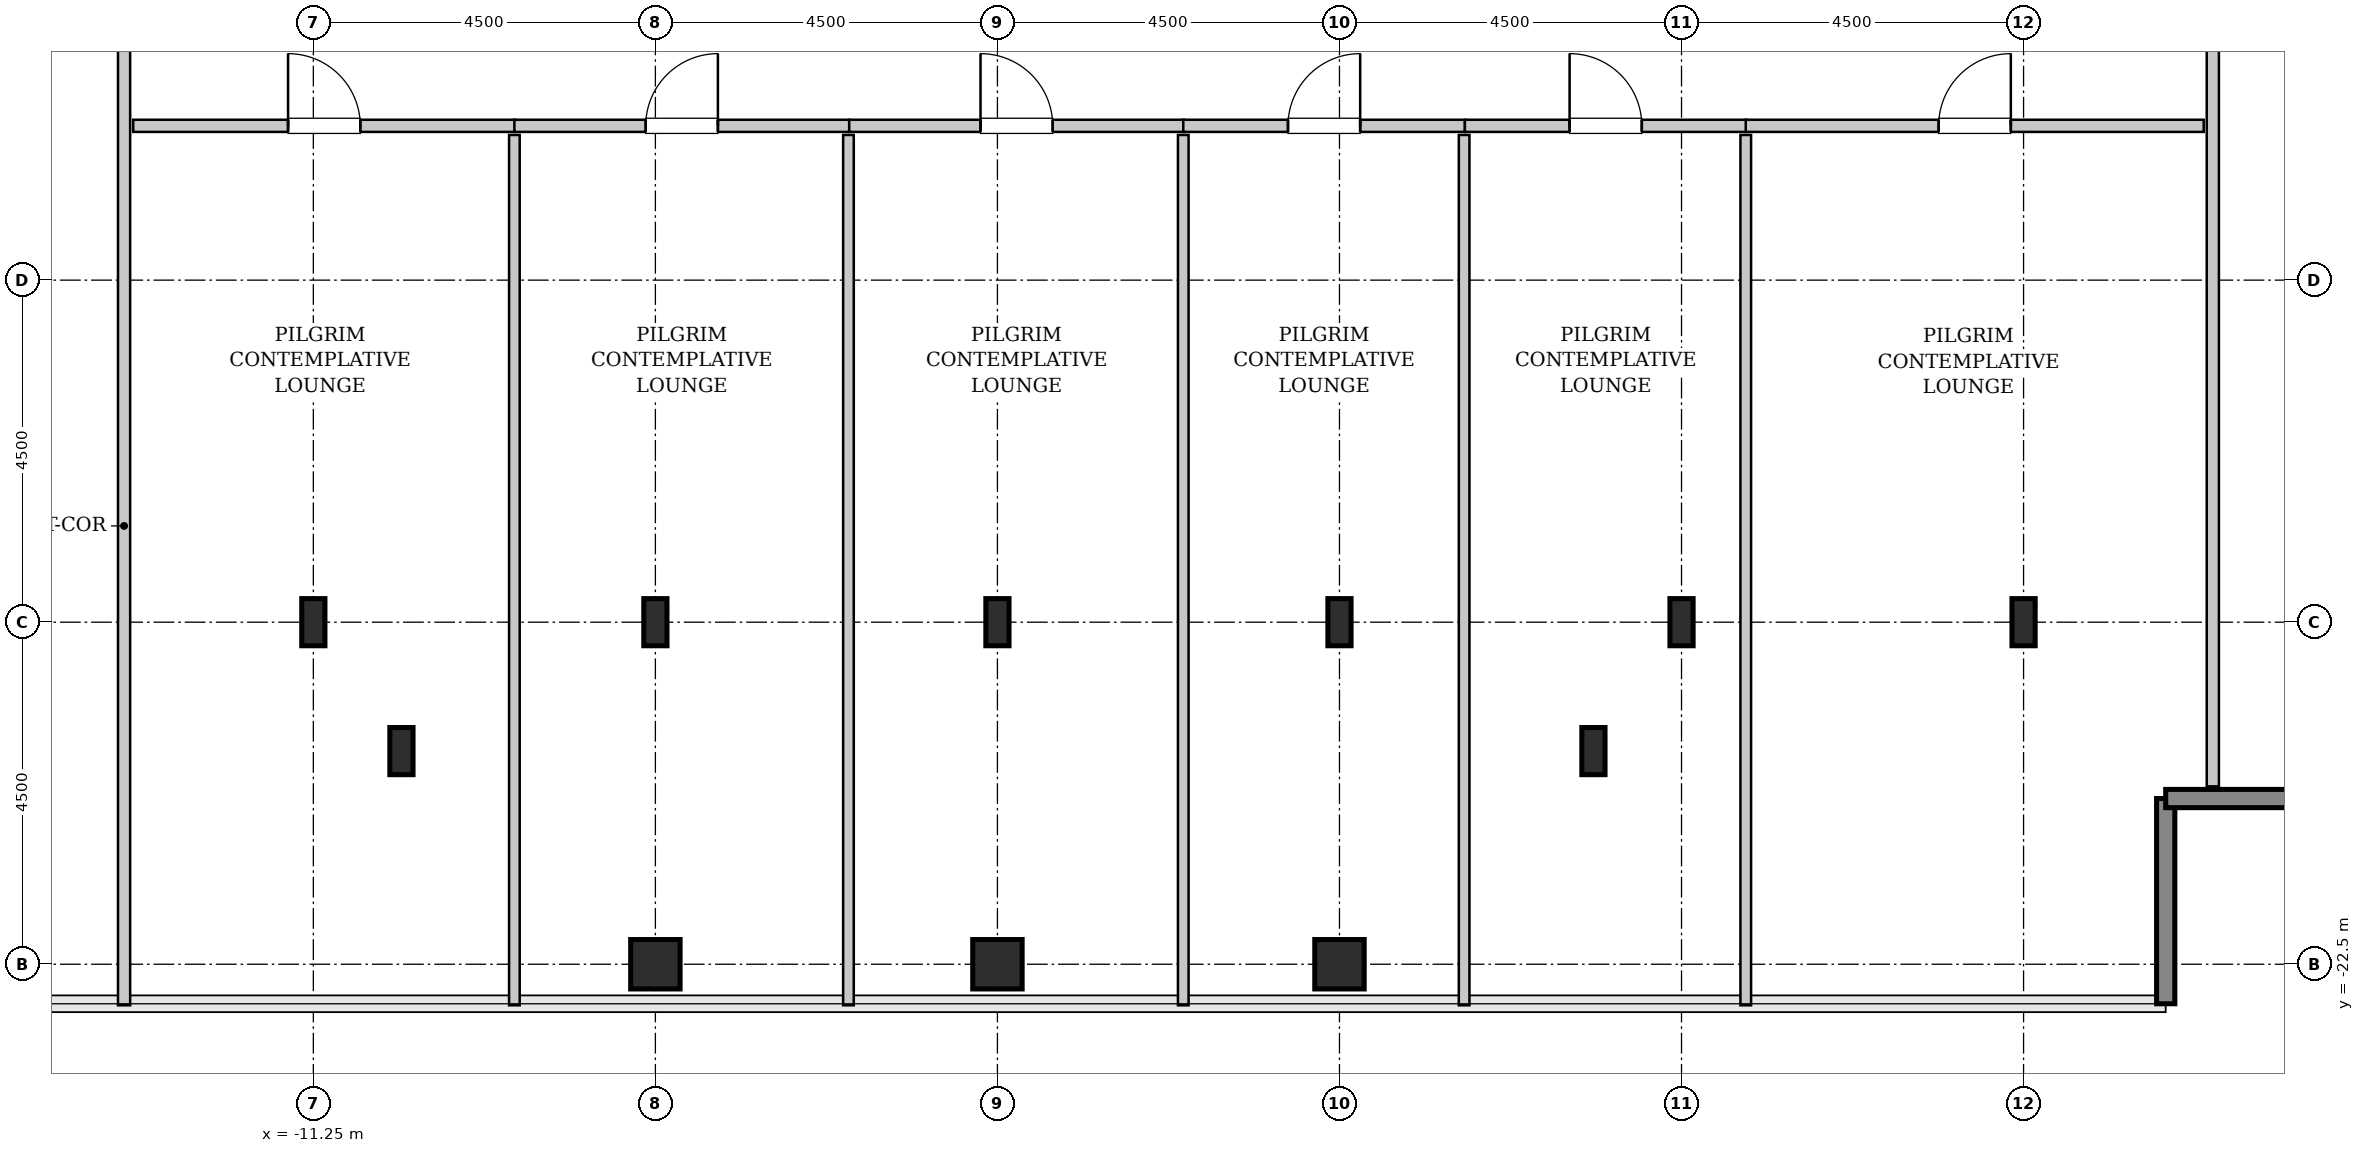
"""IFC4 building model, lengths in metres.
Left out: names, types, materials, properties, quantities, classifications, styles, units other than length and angle.
Written with IfcOpenShell. Run it as: python <this file> out.ifc"""

import sys

from ifc_helpers import new_model, si_unit, direction, frame, frame_2d, origin, origin_2d, place, context, subcontext, project, spatial, rectangle, hollow_rectangle, i_section, extrude, source, transform, mapped, element, fill, save


model = new_model("IFC4")
c1 = context("Model", 3, precision=1e-05, world=origin(), true_north=direction((0.0, 1.0)))
c2 = subcontext(c1, "Body", "Model", "MODEL_VIEW")
j1 = project(units=[si_unit("LENGTHUNIT", "METRE"), si_unit("PLANEANGLEUNIT", "RADIAN")], contexts=[c1])
p1 = place(None, origin())
s1 = spatial("IfcSite", under=j1, at=p1, CompositionType="ELEMENT")
p2 = place(p1, origin())
s2 = spatial("IfcBuilding", under=s1, at=p2, CompositionType="ELEMENT")
p3 = place(p2, frame((0.0, 0.0, 283.6)))
s3 = spatial("IfcBuildingStorey", under=s2, at=p3, CompositionType="ELEMENT", Elevation=283.6)
m1 = source(origin(), c2, "Body", "SweptSolid", [
    extrude(i_section(OverallWidth=0.305, OverallDepth=0.62, WebThickness=0.021, FlangeThickness=0.04, FilletRadius=0.027, at=origin_2d()), origin(), (0.0, 0.0, 1.0), 3.8),
])
for number, where, z_axis, x_axis in (
    (1, (-11.25, -18.0, 0.0), (0.0, 0.0, 1.0), (1.0, 0.0, 0.0)),
    (2, (-10.091, -19.696, 0.0), (0.0, 0.0, 1.0), (1.0, 0.0, 0.0)),
):
    element("IfcColumn", number, at=place(p3, frame(where, z_axis=z_axis, x_axis=x_axis)), inside=s3, PredefinedType="COLUMN", context=c2, shape_type="MappedRepresentation", body=[
        mapped(m1, transform((0.0, 0.0, 0.0), x_axis=(1.0, 0.0, 0.0), y_axis=(0.0, 1.0, 0.0), z_axis=(0.0, 0.0, 1.0), scale=1.0)),
    ])
m2 = source(origin(), c2, "Body", "SweptSolid", [
    extrude(hollow_rectangle(XDim=0.65, YDim=0.65, WallThickness=0.032, InnerFilletRadius=0.032, OuterFilletRadius=0.064, at=origin_2d()), origin(), (0.0, 0.0, 1.0), 3.8),
])
p4 = place(p3, frame((-6.75, -22.5, 0.0), z_axis=(0.0, 0.0, 1.0), x_axis=(1.0, 0.0, 0.0)))
e3 = element("IfcColumn", 3, at=p4, inside=s3, PredefinedType="COLUMN", context=c2, shape_type="MappedRepresentation", body=[
    mapped(m2, transform((0.0, 0.0, 0.0), x_axis=(1.0, 0.0, 0.0), y_axis=(0.0, 1.0, 0.0), z_axis=(0.0, 0.0, 1.0), scale=1.0)),
])
p5 = place(p3, frame((-6.75, -18.0, 0.0), z_axis=(0.0, 0.0, 1.0), x_axis=(1.0, 0.0, 0.0)))
e4 = element("IfcColumn", 4, at=p5, inside=s3, PredefinedType="COLUMN", context=c2, shape_type="MappedRepresentation", body=[
    mapped(m1, transform((0.0, 0.0, 0.0), x_axis=(1.0, 0.0, 0.0), y_axis=(0.0, 1.0, 0.0), z_axis=(0.0, 0.0, 1.0), scale=1.0)),
])
p6 = place(p3, frame((-2.25, -22.5, 0.0), z_axis=(0.0, 0.0, 1.0), x_axis=(1.0, 0.0, 0.0)))
e5 = element("IfcColumn", 5, at=p6, inside=s3, PredefinedType="COLUMN", context=c2, shape_type="MappedRepresentation", body=[
    mapped(m2, transform((0.0, 0.0, 0.0), x_axis=(1.0, 0.0, 0.0), y_axis=(0.0, 1.0, 0.0), z_axis=(0.0, 0.0, 1.0), scale=1.0)),
])
p7 = place(p3, frame((-2.25, -18.0, 0.0), z_axis=(0.0, 0.0, 1.0), x_axis=(1.0, 0.0, 0.0)))
e6 = element("IfcColumn", 6, at=p7, inside=s3, PredefinedType="COLUMN", context=c2, shape_type="MappedRepresentation", body=[
    mapped(m1, transform((0.0, 0.0, 0.0), x_axis=(1.0, 0.0, 0.0), y_axis=(0.0, 1.0, 0.0), z_axis=(0.0, 0.0, 1.0), scale=1.0)),
])
p8 = place(p3, frame((2.25, -22.5, 0.0), z_axis=(0.0, 0.0, 1.0), x_axis=(1.0, 0.0, 0.0)))
e7 = element("IfcColumn", 7, at=p8, inside=s3, PredefinedType="COLUMN", context=c2, shape_type="MappedRepresentation", body=[
    mapped(m2, transform((0.0, 0.0, 0.0), x_axis=(1.0, 0.0, 0.0), y_axis=(0.0, 1.0, 0.0), z_axis=(0.0, 0.0, 1.0), scale=1.0)),
])
for number, where, z_axis, x_axis in (
    (8, (2.25, -18.0, 0.0), (0.0, 0.0, 1.0), (1.0, 0.0, 0.0)),
    (9, (5.591, -19.696, 0.0), (0.0, 0.0, 1.0), (1.0, 0.0, 0.0)),
    (10, (6.75, -18.0, 0.0), (0.0, 0.0, 1.0), (1.0, 0.0, 0.0)),
    (11, (11.25, -18.0, 0.0), (0.0, 0.0, 1.0), (1.0, 0.0, 0.0)),
):
    element("IfcColumn", number, at=place(p3, frame(where, z_axis=z_axis, x_axis=x_axis)), inside=s3, PredefinedType="COLUMN", context=c2, shape_type="MappedRepresentation", body=[
        mapped(m1, transform((0.0, 0.0, 0.0), x_axis=(1.0, 0.0, 0.0), y_axis=(0.0, 1.0, 0.0), z_axis=(0.0, 0.0, 1.0), scale=1.0)),
    ])
m3 = source(origin(), c2, "Body", "SweptSolid", [
    extrude(rectangle(XDim=2.7, YDim=0.24, at=frame_2d((1.35, 0.0))), origin(), (0.0, 0.0, 1.0), 3.55),
])
for number, where, z_axis, x_axis in (
    (12, (13.12, -23.02, 0.0), (0.0, 0.0, 1.0), (0.0, 1.0, 0.0)),
    (13, (13.12, -20.32, 0.0), (0.0, 0.0, 1.0), (1.0, 0.0, 0.0)),
):
    element("IfcWall", number, at=place(p3, frame(where, z_axis=z_axis, x_axis=x_axis)), inside=s3, PredefinedType="SHEAR", context=c2, shape_type="MappedRepresentation", body=[
        mapped(m3, transform((0.0, 0.0, 0.0), x_axis=(1.0, 0.0, 0.0), y_axis=(0.0, 1.0, 0.0), z_axis=(0.0, 0.0, 1.0), scale=1.0)),
    ])
m4 = source(origin(), c2, "Body", "SweptSolid", [
    extrude(rectangle(XDim=14.545, YDim=0.16, at=frame_2d((7.272, 0.0))), origin(), (0.0, 0.0, 1.0), 3.535),
])
p9 = place(p3, frame((-13.74, -23.04, 0.0), z_axis=(0.0, 0.0, 1.0), x_axis=(0.0, 1.0, 0.0)))
e14 = element("IfcWall", 14, at=p9, inside=s3, PredefinedType="PARTITIONING", context=c2, shape_type="MappedRepresentation", body=[
    mapped(m4, transform((0.0, 0.0, 0.0), x_axis=(1.0, 0.0, 0.0), y_axis=(0.0, 1.0, 0.0), z_axis=(0.0, 0.0, 1.0), scale=1.0)),
])
p10 = place(p9, frame((12.562, 0.0, 0.0)))
e15 = element("IfcOpeningElement", 15, at=p10, cuts=e14, PredefinedType="OPENING", context=c2, shape_type="SweptSolid", body=[
    extrude(rectangle(XDim=0.95, YDim=2.1, at=frame_2d((0.475, 1.05))), frame((0.0, 0.09, 0.0), z_axis=(0.0, -1.0, 0.0), x_axis=(1.0, 0.0, 0.0)), (0.0, 0.0, 1.0), 0.18),
])
m5 = source(origin(), c2, "Body", "SweptSolid", [
    extrude(rectangle(XDim=12.965, YDim=0.16, at=frame_2d((6.482, 0.0))), origin(), (0.0, 0.0, 1.0), 3.535),
])
p11 = place(p3, frame((13.74, -20.16, 0.0), z_axis=(0.0, 0.0, 1.0), x_axis=(0.0, 1.0, 0.0)))
e16 = element("IfcWall", 16, at=p11, inside=s3, PredefinedType="PARTITIONING", context=c2, shape_type="MappedRepresentation", body=[
    mapped(m5, transform((0.0, 0.0, 0.0), x_axis=(1.0, 0.0, 0.0), y_axis=(0.0, 1.0, 0.0), z_axis=(0.0, 0.0, 1.0), scale=1.0)),
])
p12 = place(p11, frame((10.333, 0.0, 0.0)))
e17 = element("IfcOpeningElement", 17, at=p12, cuts=e16, PredefinedType="OPENING", context=c2, shape_type="SweptSolid", body=[
    extrude(rectangle(XDim=0.95, YDim=2.1, at=frame_2d((0.475, 1.05))), frame((0.0, 0.09, 0.0), z_axis=(0.0, -1.0, 0.0), x_axis=(1.0, 0.0, 0.0)), (0.0, 0.0, 1.0), 0.18),
])
m6 = source(origin(), c2, "Body", "SweptSolid", [
    extrude(rectangle(XDim=5.025, YDim=0.16, at=frame_2d((2.513, 0.0))), origin(), (0.0, 0.0, 1.0), 3.535),
])
p13 = place(p3, frame((-13.62, -11.47, 0.0), z_axis=(0.0, 0.0, 1.0), x_axis=(1.0, 0.0, 0.0)))
e18 = element("IfcWall", 18, at=p13, inside=s3, PredefinedType="PARTITIONING", context=c2, shape_type="MappedRepresentation", body=[
    mapped(m6, transform((0.0, 0.0, 0.0), x_axis=(1.0, 0.0, 0.0), y_axis=(0.0, 1.0, 0.0), z_axis=(0.0, 0.0, 1.0), scale=1.0)),
])
p14 = place(p13, frame((2.038, 0.0, 0.0)))
e19 = element("IfcOpeningElement", 19, at=p14, cuts=e18, PredefinedType="OPENING", context=c2, shape_type="SweptSolid", body=[
    extrude(rectangle(XDim=0.95, YDim=2.1, at=frame_2d((0.475, 1.05))), frame((0.0, 0.09, 0.0), z_axis=(0.0, -1.0, 0.0), x_axis=(1.0, 0.0, 0.0)), (0.0, 0.0, 1.0), 0.18),
])
m7 = source(origin(), c2, "Body", "SweptSolid", [
    extrude(rectangle(XDim=11.45, YDim=0.14, at=frame_2d((5.725, 0.0))), origin(), (0.0, 0.0, 1.0), 3.535),
])
p15 = place(p3, frame((-8.605, -23.04, 0.0), z_axis=(0.0, 0.0, 1.0), x_axis=(0.0, 1.0, 0.0)))
e20 = element("IfcWall", 20, at=p15, inside=s3, PredefinedType="PARTITIONING", context=c2, shape_type="MappedRepresentation", body=[
    mapped(m7, transform((0.0, 0.0, 0.0), x_axis=(1.0, 0.0, 0.0), y_axis=(0.0, 1.0, 0.0), z_axis=(0.0, 0.0, 1.0), scale=1.0)),
])
m8 = source(origin(), c2, "Body", "SweptSolid", [
    extrude(rectangle(XDim=4.405, YDim=0.16, at=frame_2d((2.203, 0.0))), origin(), (0.0, 0.0, 1.0), 3.535),
])
p16 = place(p3, frame((-8.605, -11.47, 0.0), z_axis=(0.0, 0.0, 1.0), x_axis=(1.0, 0.0, 0.0)))
e21 = element("IfcWall", 21, at=p16, inside=s3, PredefinedType="PARTITIONING", context=c2, shape_type="MappedRepresentation", body=[
    mapped(m8, transform((0.0, 0.0, 0.0), x_axis=(1.0, 0.0, 0.0), y_axis=(0.0, 1.0, 0.0), z_axis=(0.0, 0.0, 1.0), scale=1.0)),
])
p17 = place(p16, frame((1.728, 0.0, 0.0)))
e22 = element("IfcOpeningElement", 22, at=p17, cuts=e21, PredefinedType="OPENING", context=c2, shape_type="SweptSolid", body=[
    extrude(rectangle(XDim=0.95, YDim=2.1, at=frame_2d((0.475, 1.05))), frame((0.0, 0.09, 0.0), z_axis=(0.0, -1.0, 0.0), x_axis=(1.0, 0.0, 0.0)), (0.0, 0.0, 1.0), 0.18),
])
p18 = place(p3, frame((-4.21, -23.04, 0.0), z_axis=(0.0, 0.0, 1.0), x_axis=(0.0, 1.0, 0.0)))
e23 = element("IfcWall", 23, at=p18, inside=s3, PredefinedType="PARTITIONING", context=c2, shape_type="MappedRepresentation", body=[
    mapped(m7, transform((0.0, 0.0, 0.0), x_axis=(1.0, 0.0, 0.0), y_axis=(0.0, 1.0, 0.0), z_axis=(0.0, 0.0, 1.0), scale=1.0)),
])
p19 = place(p3, frame((-4.2, -11.47, 0.0), z_axis=(0.0, 0.0, 1.0), x_axis=(1.0, 0.0, 0.0)))
e24 = element("IfcWall", 24, at=p19, inside=s3, PredefinedType="PARTITIONING", context=c2, shape_type="MappedRepresentation", body=[
    mapped(m8, transform((0.0, 0.0, 0.0), x_axis=(1.0, 0.0, 0.0), y_axis=(0.0, 1.0, 0.0), z_axis=(0.0, 0.0, 1.0), scale=1.0)),
])
p20 = place(p19, frame((1.728, 0.0, 0.0)))
e25 = element("IfcOpeningElement", 25, at=p20, cuts=e24, PredefinedType="OPENING", context=c2, shape_type="SweptSolid", body=[
    extrude(rectangle(XDim=0.95, YDim=2.1, at=frame_2d((0.475, 1.05))), frame((0.0, 0.09, 0.0), z_axis=(0.0, -1.0, 0.0), x_axis=(1.0, 0.0, 0.0)), (0.0, 0.0, 1.0), 0.18),
])
p21 = place(p3, frame((0.195, -23.04, 0.0), z_axis=(0.0, 0.0, 1.0), x_axis=(0.0, 1.0, 0.0)))
e26 = element("IfcWall", 26, at=p21, inside=s3, PredefinedType="PARTITIONING", context=c2, shape_type="MappedRepresentation", body=[
    mapped(m7, transform((0.0, 0.0, 0.0), x_axis=(1.0, 0.0, 0.0), y_axis=(0.0, 1.0, 0.0), z_axis=(0.0, 0.0, 1.0), scale=1.0)),
])
m9 = source(origin(), c2, "Body", "SweptSolid", [
    extrude(rectangle(XDim=3.705, YDim=0.16, at=frame_2d((1.853, 0.0))), origin(), (0.0, 0.0, 1.0), 3.535),
])
p22 = place(p3, frame((0.195, -11.47, 0.0), z_axis=(0.0, 0.0, 1.0), x_axis=(1.0, 0.0, 0.0)))
e27 = element("IfcWall", 27, at=p22, inside=s3, PredefinedType="PARTITIONING", context=c2, shape_type="MappedRepresentation", body=[
    mapped(m9, transform((0.0, 0.0, 0.0), x_axis=(1.0, 0.0, 0.0), y_axis=(0.0, 1.0, 0.0), z_axis=(0.0, 0.0, 1.0), scale=1.0)),
])
p23 = place(p22, frame((1.377, 0.0, 0.0)))
e28 = element("IfcOpeningElement", 28, at=p23, cuts=e27, PredefinedType="OPENING", context=c2, shape_type="SweptSolid", body=[
    extrude(rectangle(XDim=0.95, YDim=2.1, at=frame_2d((0.475, 1.05))), frame((0.0, 0.09, 0.0), z_axis=(0.0, -1.0, 0.0), x_axis=(1.0, 0.0, 0.0)), (0.0, 0.0, 1.0), 0.18),
])
p24 = place(p3, frame((3.89, -23.04, 0.0), z_axis=(0.0, 0.0, 1.0), x_axis=(0.0, 1.0, 0.0)))
e29 = element("IfcWall", 29, at=p24, inside=s3, PredefinedType="PARTITIONING", context=c2, shape_type="MappedRepresentation", body=[
    mapped(m7, transform((0.0, 0.0, 0.0), x_axis=(1.0, 0.0, 0.0), y_axis=(0.0, 1.0, 0.0), z_axis=(0.0, 0.0, 1.0), scale=1.0)),
])
m10 = source(origin(), c2, "Body", "SweptSolid", [
    extrude(rectangle(XDim=3.705, YDim=0.16, at=frame_2d((1.853, 0.0))), origin(), (0.0, 0.0, 1.0), 3.535),
])
p25 = place(p3, frame((3.9, -11.47, 0.0), z_axis=(0.0, 0.0, 1.0), x_axis=(1.0, 0.0, 0.0)))
e30 = element("IfcWall", 30, at=p25, inside=s3, PredefinedType="PARTITIONING", context=c2, shape_type="MappedRepresentation", body=[
    mapped(m10, transform((0.0, 0.0, 0.0), x_axis=(1.0, 0.0, 0.0), y_axis=(0.0, 1.0, 0.0), z_axis=(0.0, 0.0, 1.0), scale=1.0)),
])
p26 = place(p25, frame((1.377, 0.0, 0.0)))
e31 = element("IfcOpeningElement", 31, at=p26, cuts=e30, PredefinedType="OPENING", context=c2, shape_type="SweptSolid", body=[
    extrude(rectangle(XDim=0.95, YDim=2.1, at=frame_2d((0.475, 1.05))), frame((0.0, 0.09, 0.0), z_axis=(0.0, -1.0, 0.0), x_axis=(1.0, 0.0, 0.0)), (0.0, 0.0, 1.0), 0.18),
])
p27 = place(p3, frame((7.595, -23.04, 0.0), z_axis=(0.0, 0.0, 1.0), x_axis=(0.0, 1.0, 0.0)))
e32 = element("IfcWall", 32, at=p27, inside=s3, PredefinedType="PARTITIONING", context=c2, shape_type="MappedRepresentation", body=[
    mapped(m7, transform((0.0, 0.0, 0.0), x_axis=(1.0, 0.0, 0.0), y_axis=(0.0, 1.0, 0.0), z_axis=(0.0, 0.0, 1.0), scale=1.0)),
])
m11 = source(origin(), c2, "Body", "SweptSolid", [
    extrude(rectangle(XDim=6.025, YDim=0.16, at=frame_2d((3.013, 0.0))), origin(), (0.0, 0.0, 1.0), 3.535),
])
p28 = place(p3, frame((7.595, -11.47, 0.0), z_axis=(0.0, 0.0, 1.0), x_axis=(1.0, 0.0, 0.0)))
e33 = element("IfcWall", 33, at=p28, inside=s3, PredefinedType="PARTITIONING", context=c2, shape_type="MappedRepresentation", body=[
    mapped(m11, transform((0.0, 0.0, 0.0), x_axis=(1.0, 0.0, 0.0), y_axis=(0.0, 1.0, 0.0), z_axis=(0.0, 0.0, 1.0), scale=1.0)),
])
p29 = place(p28, frame((2.538, 0.0, 0.0)))
e34 = element("IfcOpeningElement", 34, at=p29, cuts=e33, PredefinedType="OPENING", context=c2, shape_type="SweptSolid", body=[
    extrude(rectangle(XDim=0.95, YDim=2.1, at=frame_2d((0.475, 1.05))), frame((0.0, 0.09, 0.0), z_axis=(0.0, -1.0, 0.0), x_axis=(1.0, 0.0, 0.0)), (0.0, 0.0, 1.0), 0.18),
])
m12 = source(origin(), c2, "Body", "SweptSolid", [
    extrude(rectangle(XDim=0.95, YDim=2.1, at=frame_2d((0.475, 1.05))), frame((0.0, 0.025, 0.0), z_axis=(0.0, -1.0, 0.0), x_axis=(1.0, 0.0, 0.0)), (0.0, 0.0, 1.0), 0.05),
])
p30 = place(p14, origin())
e35 = element("IfcDoor", 35, at=p30, inside=s3, OperationType="SINGLE_SWING_LEFT", PredefinedType="DOOR", context=c2, shape_type="MappedRepresentation", body=[
    mapped(m12, transform((0.0, 0.0, 0.0), x_axis=(1.0, 0.0, 0.0), y_axis=(0.0, 1.0, 0.0), z_axis=(0.0, 0.0, 1.0), scale=1.0)),
])
fill(e19, e35)
p31 = place(p17, origin())
e36 = element("IfcDoor", 36, at=p31, inside=s3, OperationType="SINGLE_SWING_RIGHT", PredefinedType="DOOR", context=c2, shape_type="MappedRepresentation", body=[
    mapped(m12, transform((0.0, 0.0, 0.0), x_axis=(1.0, 0.0, 0.0), y_axis=(0.0, 1.0, 0.0), z_axis=(0.0, 0.0, 1.0), scale=1.0)),
])
fill(e22, e36)
p32 = place(p20, origin())
e37 = element("IfcDoor", 37, at=p32, inside=s3, OperationType="SINGLE_SWING_LEFT", PredefinedType="DOOR", context=c2, shape_type="MappedRepresentation", body=[
    mapped(m12, transform((0.0, 0.0, 0.0), x_axis=(1.0, 0.0, 0.0), y_axis=(0.0, 1.0, 0.0), z_axis=(0.0, 0.0, 1.0), scale=1.0)),
])
fill(e25, e37)
p33 = place(p23, origin())
e38 = element("IfcDoor", 38, at=p33, inside=s3, OperationType="SINGLE_SWING_RIGHT", PredefinedType="DOOR", context=c2, shape_type="MappedRepresentation", body=[
    mapped(m12, transform((0.0, 0.0, 0.0), x_axis=(1.0, 0.0, 0.0), y_axis=(0.0, 1.0, 0.0), z_axis=(0.0, 0.0, 1.0), scale=1.0)),
])
fill(e28, e38)
p34 = place(p26, origin())
e39 = element("IfcDoor", 39, at=p34, inside=s3, OperationType="SINGLE_SWING_LEFT", PredefinedType="DOOR", context=c2, shape_type="MappedRepresentation", body=[
    mapped(m12, transform((0.0, 0.0, 0.0), x_axis=(1.0, 0.0, 0.0), y_axis=(0.0, 1.0, 0.0), z_axis=(0.0, 0.0, 1.0), scale=1.0)),
])
fill(e31, e39)
p35 = place(p29, origin())
e40 = element("IfcDoor", 40, at=p35, inside=s3, OperationType="SINGLE_SWING_RIGHT", PredefinedType="DOOR", context=c2, shape_type="MappedRepresentation", body=[
    mapped(m12, transform((0.0, 0.0, 0.0), x_axis=(1.0, 0.0, 0.0), y_axis=(0.0, 1.0, 0.0), z_axis=(0.0, 0.0, 1.0), scale=1.0)),
])
fill(e34, e40)
save(model, sys.argv[1])
